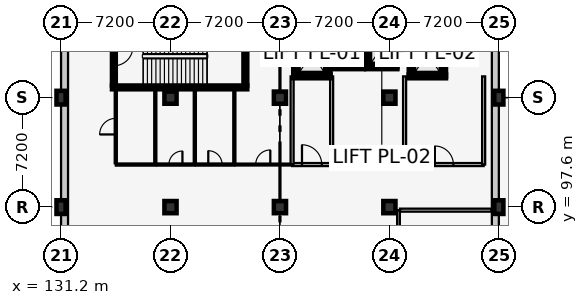
"""IFC4 building model, lengths in metres.
Left out: names, types, materials, properties, quantities, classifications, styles, units other than length and angle.
Written with IfcOpenShell. Run it as: python <this file> out.ifc"""

import sys

from ifc_helpers import new_model, si_unit, direction, frame, frame_2d, origin, origin_2d, place, context, subcontext, project, spatial, rectangle, extrude, element, fill, save


model = new_model("IFC4")
c1 = context("Model", 3, precision=1e-05, world=origin(), true_north=direction((0.0, 1.0)))
c2 = subcontext(c1, "Body", "Model", "MODEL_VIEW")
j1 = project(units=[si_unit("LENGTHUNIT", "METRE"), si_unit("PLANEANGLEUNIT", "RADIAN")], contexts=[c1])
p1 = place(None, origin())
s1 = spatial("IfcSite", under=j1, at=p1, CompositionType="ELEMENT")
p2 = place(p1, origin())
s2 = spatial("IfcBuilding", under=s1, at=p2, CompositionType="ELEMENT")
p3 = place(p2, origin())
s3 = spatial("IfcBuildingStorey", under=s2, at=p3, CompositionType="ELEMENT", Elevation=0.0)
for number, where, z_axis, x_axis in (
    (1, (131.2, 97.6, 0.0), (0.0, 0.0, 1.0), (1.0, 0.0, 0.0)),
    (2, (131.2, 104.8, 0.0), (0.0, 0.0, 1.0), (1.0, 0.0, 0.0)),
):
    element("IfcColumn", number, at=place(p3, frame(where, z_axis=z_axis, x_axis=x_axis)), inside=s3, PredefinedType="COLUMN", context=c2, shape_type="SweptSolid", body=[
        extrude(rectangle(XDim=0.6, YDim=0.9, at=origin_2d()), origin(), (0.0, 0.0, 1.0), 5.4),
    ])
for number, where, z_axis, x_axis in (
    (3, (138.4, 97.6, 0.0), (0.0, 0.0, 1.0), (1.0, 0.0, 0.0)),
    (4, (138.4, 104.8, 0.0), (0.0, 0.0, 1.0), (1.0, 0.0, 0.0)),
    (5, (145.6, 97.6, 0.0), (0.0, 0.0, 1.0), (1.0, 0.0, 0.0)),
    (6, (145.6, 104.8, 0.0), (0.0, 0.0, 1.0), (1.0, 0.0, 0.0)),
    (7, (152.8, 97.6, 0.0), (0.0, 0.0, 1.0), (1.0, 0.0, 0.0)),
    (8, (152.8, 104.8, 0.0), (0.0, 0.0, 1.0), (1.0, 0.0, 0.0)),
):
    element("IfcColumn", number, at=place(p3, frame(where, z_axis=z_axis, x_axis=x_axis)), inside=s3, PredefinedType="COLUMN", context=c2, shape_type="SweptSolid", body=[
        extrude(rectangle(XDim=0.8, YDim=0.8, at=origin_2d()), origin(), (0.0, 0.0, 1.0), 5.4),
    ])
for number, where, z_axis, x_axis in (
    (9, (160.0, 97.6, 0.0), (0.0, 0.0, 1.0), (1.0, 0.0, 0.0)),
    (10, (160.0, 104.8, 0.0), (0.0, 0.0, 1.0), (1.0, 0.0, 0.0)),
):
    element("IfcColumn", number, at=place(p3, frame(where, z_axis=z_axis, x_axis=x_axis)), inside=s3, PredefinedType="COLUMN", context=c2, shape_type="SweptSolid", body=[
        extrude(rectangle(XDim=0.6, YDim=0.9, at=origin_2d()), origin(), (0.0, 0.0, 1.0), 5.4),
    ])
p4 = place(p3, frame((159.77, 112.0, 0.0), z_axis=(0.0, 0.0, 1.0), x_axis=(0.0, -1.0, 0.0)))
e11 = element("IfcWall", 11, at=p4, inside=s3, PredefinedType="SOLIDWALL", context=c2, shape_type="SweptSolid", body=[
    extrude(rectangle(XDim=28.8, YDim=0.46, at=frame_2d((14.4, 0.0))), origin(), (0.0, 0.0, 1.0), 4.535),
])
p5 = place(p4, frame((16.8, 0.0, 0.0)))
e12 = element("IfcOpeningElement", 12, at=p5, cuts=e11, PredefinedType="OPENING", context=c2, shape_type="SweptSolid", body=[
    extrude(rectangle(XDim=2.4, YDim=2.4, at=frame_2d((1.2, 1.2))), frame((0.0, 0.242, 0.0), z_axis=(0.0, -1.0, 0.0), x_axis=(1.0, 0.0, 0.0)), (0.0, 0.0, 1.0), 0.484),
])
p6 = place(p3, frame((131.43, 83.2, 0.0), z_axis=(0.0, 0.0, 1.0), x_axis=(0.0, 1.0, 0.0)))
e13 = element("IfcWall", 13, at=p6, inside=s3, PredefinedType="SOLIDWALL", context=c2, shape_type="SweptSolid", body=[
    extrude(rectangle(XDim=28.8, YDim=0.46, at=frame_2d((14.4, 0.0))), origin(), (0.0, 0.0, 1.0), 4.535),
])
p7 = place(p6, frame((9.8, 0.0, 0.0)))
e14 = element("IfcOpeningElement", 14, at=p7, cuts=e13, PredefinedType="OPENING", context=c2, shape_type="SweptSolid", body=[
    extrude(rectangle(XDim=2.0, YDim=2.35, at=frame_2d((1.0, 1.175))), frame((0.0, 0.242, 0.0), z_axis=(0.0, -1.0, 0.0), x_axis=(1.0, 0.0, 0.0)), (0.0, 0.0, 1.0), 0.484),
])
p8 = place(p3, frame((134.55, 105.475, 0.0), z_axis=(0.0, 0.0, 1.0), x_axis=(1.0, 0.0, 0.0)))
e15 = element("IfcWall", 15, at=p8, inside=s3, PredefinedType="SHEAR", context=c2, shape_type="SweptSolid", body=[
    extrude(rectangle(XDim=8.9, YDim=0.25, at=frame_2d((4.45, 0.0))), origin(), (0.0, 0.0, 1.0), 5.14),
])
p9 = place(p3, frame((134.675, 109.45, 0.0), z_axis=(0.0, 0.0, 1.0), x_axis=(0.0, -1.0, 0.0)))
e16 = element("IfcWall", 16, at=p9, inside=s3, PredefinedType="SHEAR", context=c2, shape_type="SweptSolid", body=[
    extrude(rectangle(XDim=3.85, YDim=0.25, at=frame_2d((1.925, 0.0))), origin(), (0.0, 0.0, 1.0), 5.14),
])
p10 = place(p9, frame((1.3, 0.0, 0.0)))
e17 = element("IfcOpeningElement", 17, at=p10, cuts=e16, PredefinedType="OPENING", context=c2, shape_type="SweptSolid", body=[
    extrude(rectangle(XDim=1.25, YDim=2.15, at=frame_2d((0.625, 1.075))), frame((0.0, 0.137, 0.0), z_axis=(0.0, -1.0, 0.0), x_axis=(1.0, 0.0, 0.0)), (0.0, 0.0, 1.0), 0.274),
])
p11 = place(p3, frame((143.325, 105.6, 0.0), z_axis=(0.0, 0.0, 1.0), x_axis=(0.0, 1.0, 0.0)))
e18 = element("IfcWall", 18, at=p11, inside=s3, PredefinedType="SHEAR", context=c2, shape_type="SweptSolid", body=[
    extrude(rectangle(XDim=3.85, YDim=0.25, at=frame_2d((1.925, 0.0))), origin(), (0.0, 0.0, 1.0), 5.14),
])
p12 = place(p3, frame((146.475, 106.2, 0.0), z_axis=(0.0, 0.0, 1.0), x_axis=(1.0, 0.0, 0.0)))
e19 = element("IfcWall", 19, at=p12, inside=s3, PredefinedType="SHEAR", context=c2, shape_type="SweptSolid", body=[
    extrude(rectangle(XDim=2.45, YDim=0.25, at=frame_2d((1.225, 0.0))), origin(), (0.0, 0.0, 1.0), 5.14),
])
p13 = place(p12, frame((0.675, 0.0, 0.0)))
e20 = element("IfcOpeningElement", 20, at=p13, cuts=e19, PredefinedType="OPENING", context=c2, shape_type="SweptSolid", body=[
    extrude(rectangle(XDim=1.1, YDim=2.15, at=frame_2d((0.55, 1.075))), frame((0.0, 0.137, 0.0), z_axis=(0.0, -1.0, 0.0), x_axis=(1.0, 0.0, 0.0)), (0.0, 0.0, 1.0), 0.274),
])
for number, where, z_axis, x_axis in (
    (21, (146.6, 109.2, 0.0), (0.0, 0.0, 1.0), (0.0, -1.0, 0.0)),
    (22, (148.8, 106.2, 0.0), (0.0, 0.0, 1.0), (0.0, 1.0, 0.0)),
):
    element("IfcWall", number, at=place(p3, frame(where, z_axis=z_axis, x_axis=x_axis)), inside=s3, PredefinedType="SHEAR", context=c2, shape_type="SweptSolid", body=[
        extrude(rectangle(XDim=3.0, YDim=0.25, at=frame_2d((1.5, 0.0))), origin(), (0.0, 0.0, 1.0), 5.14),
    ])
p14 = place(p3, frame((146.4, 100.4, 0.0), z_axis=(0.0, 0.0, 1.0), x_axis=(1.0, 0.0, 0.0)))
e23 = element("IfcWall", 23, at=p14, inside=s3, PredefinedType="PARTITIONING", context=c2, shape_type="SweptSolid", body=[
    extrude(rectangle(XDim=2.6, YDim=0.2, at=frame_2d((1.3, 0.0))), origin(), (0.0, 0.0, 1.0), 5.14),
])
p15 = place(p14, frame((0.65, 0.0, 0.0)))
e24 = element("IfcOpeningElement", 24, at=p15, cuts=e23, PredefinedType="OPENING", context=c2, shape_type="SweptSolid", body=[
    extrude(rectangle(XDim=1.3, YDim=2.2, at=frame_2d((0.65, 1.1))), frame((0.0, 0.112, 0.0), z_axis=(0.0, -1.0, 0.0), x_axis=(1.0, 0.0, 0.0)), (0.0, 0.0, 1.0), 0.224),
])
p16 = place(p3, frame((146.4, 106.2, 0.0), z_axis=(0.0, 0.0, 1.0), x_axis=(0.0, -1.0, 0.0)))
e25 = element("IfcWall", 25, at=p16, inside=s3, PredefinedType="PARTITIONING", context=c2, shape_type="SweptSolid", body=[
    extrude(rectangle(XDim=5.8, YDim=0.2, at=frame_2d((2.9, 0.0))), origin(), (0.0, 0.0, 1.0), 5.14),
])
p17 = place(p3, frame((149.0, 100.4, 0.0), z_axis=(0.0, 0.0, 1.0), x_axis=(0.0, 1.0, 0.0)))
e26 = element("IfcWall", 26, at=p17, inside=s3, PredefinedType="PARTITIONING", context=c2, shape_type="SweptSolid", body=[
    extrude(rectangle(XDim=5.8, YDim=0.2, at=frame_2d((2.9, 0.0))), origin(), (0.0, 0.0, 1.0), 4.755),
])
p18 = place(p3, frame((154.075, 106.2, 0.0), z_axis=(0.0, 0.0, 1.0), x_axis=(1.0, 0.0, 0.0)))
e27 = element("IfcWall", 27, at=p18, inside=s3, PredefinedType="SHEAR", context=c2, shape_type="SweptSolid", body=[
    extrude(rectangle(XDim=2.45, YDim=0.25, at=frame_2d((1.225, 0.0))), origin(), (0.0, 0.0, 1.0), 5.14),
])
p19 = place(p18, frame((0.675, 0.0, 0.0)))
e28 = element("IfcOpeningElement", 28, at=p19, cuts=e27, PredefinedType="OPENING", context=c2, shape_type="SweptSolid", body=[
    extrude(rectangle(XDim=1.1, YDim=2.15, at=frame_2d((0.55, 1.075))), frame((0.0, 0.137, 0.0), z_axis=(0.0, -1.0, 0.0), x_axis=(1.0, 0.0, 0.0)), (0.0, 0.0, 1.0), 0.274),
])
for number, where, z_axis, x_axis in (
    (29, (154.2, 109.2, 0.0), (0.0, 0.0, 1.0), (0.0, -1.0, 0.0)),
    (30, (156.4, 106.2, 0.0), (0.0, 0.0, 1.0), (0.0, 1.0, 0.0)),
):
    element("IfcWall", number, at=place(p3, frame(where, z_axis=z_axis, x_axis=x_axis)), inside=s3, PredefinedType="SHEAR", context=c2, shape_type="SweptSolid", body=[
        extrude(rectangle(XDim=3.0, YDim=0.25, at=frame_2d((1.5, 0.0))), origin(), (0.0, 0.0, 1.0), 5.14),
    ])
p20 = place(p3, frame((153.8, 100.4, 0.0), z_axis=(0.0, 0.0, 1.0), x_axis=(1.0, 0.0, 0.0)))
e31 = element("IfcWall", 31, at=p20, inside=s3, PredefinedType="PARTITIONING", context=c2, shape_type="SweptSolid", body=[
    extrude(rectangle(XDim=5.2, YDim=0.2, at=frame_2d((2.6, 0.0))), origin(), (0.0, 0.0, 1.0), 5.14),
])
p21 = place(p20, frame((1.99, 0.0, 0.0)))
e32 = element("IfcOpeningElement", 32, at=p21, cuts=e31, PredefinedType="OPENING", context=c2, shape_type="SweptSolid", body=[
    extrude(rectangle(XDim=1.22, YDim=2.2, at=frame_2d((0.61, 1.1))), frame((0.0, 0.112, 0.0), z_axis=(0.0, -1.0, 0.0), x_axis=(1.0, 0.0, 0.0)), (0.0, 0.0, 1.0), 0.224),
])
for number, where, z_axis, x_axis in (
    (33, (153.8, 106.2, 0.0), (0.0, 0.0, 1.0), (0.0, -1.0, 0.0)),
    (34, (159.0, 100.4, 0.0), (0.0, 0.0, 1.0), (0.0, 1.0, 0.0)),
):
    element("IfcWall", number, at=place(p3, frame(where, z_axis=z_axis, x_axis=x_axis)), inside=s3, PredefinedType="PARTITIONING", context=c2, shape_type="SweptSolid", body=[
        extrude(rectangle(XDim=5.8, YDim=0.2, at=frame_2d((2.9, 0.0))), origin(), (0.0, 0.0, 1.0), 5.14),
    ])
p22 = place(p3, frame((149.075, 106.8, 0.0), z_axis=(0.0, 0.0, 1.0), x_axis=(1.0, 0.0, 0.0)))
e35 = element("IfcWall", 35, at=p22, inside=s3, PredefinedType="SHEAR", context=c2, shape_type="SweptSolid", body=[
    extrude(rectangle(XDim=2.05, YDim=0.25, at=frame_2d((1.025, 0.0))), origin(), (0.0, 0.0, 1.0), 5.14),
])
p23 = place(p22, frame((0.525, 0.0, 0.0)))
e36 = element("IfcOpeningElement", 36, at=p23, cuts=e35, PredefinedType="OPENING", context=c2, shape_type="SweptSolid", body=[
    extrude(rectangle(XDim=1.0, YDim=2.15, at=frame_2d((0.5, 1.075))), frame((0.0, 0.137, 0.0), z_axis=(0.0, -1.0, 0.0), x_axis=(1.0, 0.0, 0.0)), (0.0, 0.0, 1.0), 0.274),
])
for number, where, z_axis, x_axis in (
    (37, (149.2, 109.4, 0.0), (0.0, 0.0, 1.0), (0.0, -1.0, 0.0)),
    (38, (151.0, 106.8, 0.0), (0.0, 0.0, 1.0), (0.0, 1.0, 0.0)),
):
    element("IfcWall", number, at=place(p3, frame(where, z_axis=z_axis, x_axis=x_axis)), inside=s3, PredefinedType="SHEAR", context=c2, shape_type="SweptSolid", body=[
        extrude(rectangle(XDim=2.6, YDim=0.25, at=frame_2d((1.3, 0.0))), origin(), (0.0, 0.0, 1.0), 5.14),
    ])
p24 = place(p3, frame((151.275, 106.8, 0.0), z_axis=(0.0, 0.0, 1.0), x_axis=(1.0, 0.0, 0.0)))
e39 = element("IfcWall", 39, at=p24, inside=s3, PredefinedType="SHEAR", context=c2, shape_type="SweptSolid", body=[
    extrude(rectangle(XDim=2.05, YDim=0.25, at=frame_2d((1.025, 0.0))), origin(), (0.0, 0.0, 1.0), 5.14),
])
p25 = place(p24, frame((0.525, 0.0, 0.0)))
e40 = element("IfcOpeningElement", 40, at=p25, cuts=e39, PredefinedType="OPENING", context=c2, shape_type="SweptSolid", body=[
    extrude(rectangle(XDim=1.0, YDim=2.15, at=frame_2d((0.5, 1.075))), frame((0.0, 0.137, 0.0), z_axis=(0.0, -1.0, 0.0), x_axis=(1.0, 0.0, 0.0)), (0.0, 0.0, 1.0), 0.274),
])
for number, where, z_axis, x_axis in (
    (41, (151.4, 109.4, 0.0), (0.0, 0.0, 1.0), (0.0, -1.0, 0.0)),
    (42, (153.2, 106.8, 0.0), (0.0, 0.0, 1.0), (0.0, 1.0, 0.0)),
):
    element("IfcWall", number, at=place(p3, frame(where, z_axis=z_axis, x_axis=x_axis)), inside=s3, PredefinedType="SHEAR", context=c2, shape_type="SweptSolid", body=[
        extrude(rectangle(XDim=2.6, YDim=0.25, at=frame_2d((1.3, 0.0))), origin(), (0.0, 0.0, 1.0), 5.14),
    ])
p26 = place(p3, frame((134.8, 100.4, 0.0), z_axis=(0.0, 0.0, 1.0), x_axis=(1.0, 0.0, 0.0)))
e43 = element("IfcWall", 43, at=p26, inside=s3, PredefinedType="PARTITIONING", context=c2, shape_type="SweptSolid", body=[
    extrude(rectangle(XDim=2.6, YDim=0.14, at=frame_2d((1.3, 0.0))), origin(), (0.0, 0.0, 1.0), 5.14),
])
p27 = place(p3, frame((134.8, 100.48, 0.0), z_axis=(0.0, 0.0, 1.0), x_axis=(0.0, 1.0, 0.0)))
e44 = element("IfcWall", 44, at=p27, inside=s3, PredefinedType="PARTITIONING", context=c2, shape_type="SweptSolid", body=[
    extrude(rectangle(XDim=4.86, YDim=0.14, at=frame_2d((2.43, 0.0))), origin(), (0.0, 0.0, 1.0), 4.725),
])
p28 = place(p27, frame((1.9, 0.0, 0.0)))
e45 = element("IfcOpeningElement", 45, at=p28, cuts=e44, PredefinedType="OPENING", context=c2, shape_type="SweptSolid", body=[
    extrude(rectangle(XDim=1.06, YDim=2.1, at=frame_2d((0.53, 1.05))), frame((0.0, 0.082, 0.0), z_axis=(0.0, -1.0, 0.0), x_axis=(1.0, 0.0, 0.0)), (0.0, 0.0, 1.0), 0.164),
])
p29 = place(p3, frame((137.4, 100.48, 0.0), z_axis=(0.0, 0.0, 1.0), x_axis=(0.0, 1.0, 0.0)))
e46 = element("IfcWall", 46, at=p29, inside=s3, PredefinedType="PARTITIONING", context=c2, shape_type="SweptSolid", body=[
    extrude(rectangle(XDim=4.86, YDim=0.14, at=frame_2d((2.43, 0.0))), origin(), (0.0, 0.0, 1.0), 5.14),
])
p30 = place(p3, frame((137.48, 100.4, 0.0), z_axis=(0.0, 0.0, 1.0), x_axis=(1.0, 0.0, 0.0)))
e47 = element("IfcWall", 47, at=p30, inside=s3, PredefinedType="PARTITIONING", context=c2, shape_type="SweptSolid", body=[
    extrude(rectangle(XDim=2.52, YDim=0.14, at=frame_2d((1.26, 0.0))), origin(), (0.0, 0.0, 1.0), 5.14),
])
p31 = place(p30, frame((0.815, 0.0, 0.0)))
e48 = element("IfcOpeningElement", 48, at=p31, cuts=e47, PredefinedType="OPENING", context=c2, shape_type="SweptSolid", body=[
    extrude(rectangle(XDim=0.89, YDim=2.05, at=frame_2d((0.445, 1.025))), frame((0.0, 0.082, 0.0), z_axis=(0.0, -1.0, 0.0), x_axis=(1.0, 0.0, 0.0)), (0.0, 0.0, 1.0), 0.164),
])
p32 = place(p3, frame((140.0, 100.48, 0.0), z_axis=(0.0, 0.0, 1.0), x_axis=(0.0, 1.0, 0.0)))
e49 = element("IfcWall", 49, at=p32, inside=s3, PredefinedType="PARTITIONING", context=c2, shape_type="SweptSolid", body=[
    extrude(rectangle(XDim=4.86, YDim=0.14, at=frame_2d((2.43, 0.0))), origin(), (0.0, 0.0, 1.0), 5.14),
])
p33 = place(p3, frame((140.08, 100.4, 0.0), z_axis=(0.0, 0.0, 1.0), x_axis=(1.0, 0.0, 0.0)))
e50 = element("IfcWall", 50, at=p33, inside=s3, PredefinedType="PARTITIONING", context=c2, shape_type="SweptSolid", body=[
    extrude(rectangle(XDim=2.52, YDim=0.14, at=frame_2d((1.26, 0.0))), origin(), (0.0, 0.0, 1.0), 5.14),
])
p34 = place(p33, frame((0.805, 0.0, 0.0)))
e51 = element("IfcOpeningElement", 51, at=p34, cuts=e50, PredefinedType="OPENING", context=c2, shape_type="SweptSolid", body=[
    extrude(rectangle(XDim=0.91, YDim=2.06, at=frame_2d((0.455, 1.03))), frame((0.0, 0.082, 0.0), z_axis=(0.0, -1.0, 0.0), x_axis=(1.0, 0.0, 0.0)), (0.0, 0.0, 1.0), 0.164),
])
p35 = place(p3, frame((142.6, 100.48, 0.0), z_axis=(0.0, 0.0, 1.0), x_axis=(0.0, 1.0, 0.0)))
e52 = element("IfcWall", 52, at=p35, inside=s3, PredefinedType="PARTITIONING", context=c2, shape_type="SweptSolid", body=[
    extrude(rectangle(XDim=4.86, YDim=0.14, at=frame_2d((2.43, 0.0))), origin(), (0.0, 0.0, 1.0), 5.14),
])
p36 = place(p3, frame((142.68, 100.4, 0.0), z_axis=(0.0, 0.0, 1.0), x_axis=(1.0, 0.0, 0.0)))
e53 = element("IfcWall", 53, at=p36, inside=s3, PredefinedType="PARTITIONING", context=c2, shape_type="SweptSolid", body=[
    extrude(rectangle(XDim=3.61, YDim=0.125, at=frame_2d((1.805, 0.0))), origin(), (0.0, 0.0, 1.0), 5.14),
])
p37 = place(p36, frame((1.325, 0.0, 0.0)))
e54 = element("IfcOpeningElement", 54, at=p37, cuts=e53, PredefinedType="OPENING", context=c2, shape_type="SweptSolid", body=[
    extrude(rectangle(XDim=0.96, YDim=2.1, at=frame_2d((0.48, 1.05))), frame((0.0, 0.074, 0.0), z_axis=(0.0, -1.0, 0.0), x_axis=(1.0, 0.0, 0.0)), (0.0, 0.0, 1.0), 0.149),
])
p38 = place(p3, frame((153.4, 90.5, 0.0), z_axis=(0.0, 0.0, 1.0), x_axis=(0.0, 1.0, 0.0)))
e55 = element("IfcWall", 55, at=p38, inside=s3, PredefinedType="PARTITIONING", context=c2, shape_type="SweptSolid", body=[
    extrude(rectangle(XDim=6.9, YDim=0.18, at=frame_2d((3.45, 0.0))), origin(), (0.0, 0.0, 1.0), 5.14),
])
p39 = place(p38, frame((2.79, 0.0, 0.0)))
e56 = element("IfcOpeningElement", 56, at=p39, cuts=e55, PredefinedType="OPENING", context=c2, shape_type="SweptSolid", body=[
    extrude(rectangle(XDim=1.32, YDim=2.15, at=frame_2d((0.66, 1.075))), frame((0.0, 0.102, 0.0), z_axis=(0.0, -1.0, 0.0), x_axis=(1.0, 0.0, 0.0)), (0.0, 0.0, 1.0), 0.204),
])
p40 = place(p3, frame((153.5, 97.4, 0.0), z_axis=(0.0, 0.0, 1.0), x_axis=(1.0, 0.0, 0.0)))
e57 = element("IfcWall", 57, at=p40, inside=s3, PredefinedType="PARTITIONING", context=c2, shape_type="SweptSolid", body=[
    extrude(rectangle(XDim=6.03, YDim=0.2, at=frame_2d((3.015, 0.0))), origin(), (0.0, 0.0, 1.0), 4.365),
])
p41 = place(p10, origin())
e58 = element("IfcDoor", 58, at=p41, inside=s3, OperationType="SINGLE_SWING_LEFT", PredefinedType="DOOR", context=c2, shape_type="SweptSolid", body=[
    extrude(rectangle(XDim=1.25, YDim=2.15, at=frame_2d((0.625, 1.075))), frame((0.0, 0.025, 0.0), z_axis=(0.0, -1.0, 0.0), x_axis=(1.0, 0.0, 0.0)), (0.0, 0.0, 1.0), 0.05),
])
fill(e17, e58)
p42 = place(p13, origin())
e59 = element("IfcDoor", 59, at=p42, inside=s3, OperationType="SLIDING_TO_LEFT", PredefinedType="DOOR", context=c2, shape_type="SweptSolid", body=[
    extrude(rectangle(XDim=1.1, YDim=2.15, at=frame_2d((0.55, 1.075))), frame((0.0, 0.025, 0.0), z_axis=(0.0, -1.0, 0.0), x_axis=(1.0, 0.0, 0.0)), (0.0, 0.0, 1.0), 0.05),
])
fill(e20, e59)
p43 = place(p15, origin())
e60 = element("IfcDoor", 60, at=p43, inside=s3, OperationType="SINGLE_SWING_LEFT", PredefinedType="DOOR", context=c2, shape_type="SweptSolid", body=[
    extrude(rectangle(XDim=1.3, YDim=2.2, at=frame_2d((0.65, 1.1))), frame((0.0, 0.025, 0.0), z_axis=(0.0, -1.0, 0.0), x_axis=(1.0, 0.0, 0.0)), (0.0, 0.0, 1.0), 0.05),
])
fill(e24, e60)
p44 = place(p19, origin())
e61 = element("IfcDoor", 61, at=p44, inside=s3, OperationType="SLIDING_TO_LEFT", PredefinedType="DOOR", context=c2, shape_type="SweptSolid", body=[
    extrude(rectangle(XDim=1.1, YDim=2.15, at=frame_2d((0.55, 1.075))), frame((0.0, 0.025, 0.0), z_axis=(0.0, -1.0, 0.0), x_axis=(1.0, 0.0, 0.0)), (0.0, 0.0, 1.0), 0.05),
])
fill(e28, e61)
p45 = place(p21, origin())
e62 = element("IfcDoor", 62, at=p45, inside=s3, OperationType="SINGLE_SWING_LEFT", PredefinedType="DOOR", context=c2, shape_type="SweptSolid", body=[
    extrude(rectangle(XDim=1.22, YDim=2.2, at=frame_2d((0.61, 1.1))), frame((0.0, 0.025, 0.0), z_axis=(0.0, -1.0, 0.0), x_axis=(1.0, 0.0, 0.0)), (0.0, 0.0, 1.0), 0.05),
])
fill(e32, e62)
p46 = place(p23, origin())
e63 = element("IfcDoor", 63, at=p46, inside=s3, OperationType="SLIDING_TO_LEFT", PredefinedType="DOOR", context=c2, shape_type="SweptSolid", body=[
    extrude(rectangle(XDim=1.0, YDim=2.15, at=frame_2d((0.5, 1.075))), frame((0.0, 0.025, 0.0), z_axis=(0.0, -1.0, 0.0), x_axis=(1.0, 0.0, 0.0)), (0.0, 0.0, 1.0), 0.05),
])
fill(e36, e63)
p47 = place(p25, origin())
e64 = element("IfcDoor", 64, at=p47, inside=s3, OperationType="SLIDING_TO_LEFT", PredefinedType="DOOR", context=c2, shape_type="SweptSolid", body=[
    extrude(rectangle(XDim=1.0, YDim=2.15, at=frame_2d((0.5, 1.075))), frame((0.0, 0.025, 0.0), z_axis=(0.0, -1.0, 0.0), x_axis=(1.0, 0.0, 0.0)), (0.0, 0.0, 1.0), 0.05),
])
fill(e40, e64)
p48 = place(p28, origin())
e65 = element("IfcDoor", 65, at=p48, inside=s3, OperationType="SINGLE_SWING_LEFT", PredefinedType="DOOR", context=c2, shape_type="SweptSolid", body=[
    extrude(rectangle(XDim=1.06, YDim=2.1, at=frame_2d((0.53, 1.05))), frame((0.0, 0.025, 0.0), z_axis=(0.0, -1.0, 0.0), x_axis=(1.0, 0.0, 0.0)), (0.0, 0.0, 1.0), 0.05),
])
fill(e45, e65)
p49 = place(p31, origin())
e66 = element("IfcDoor", 66, at=p49, inside=s3, OperationType="SINGLE_SWING_RIGHT", PredefinedType="DOOR", context=c2, shape_type="SweptSolid", body=[
    extrude(rectangle(XDim=0.89, YDim=2.05, at=frame_2d((0.445, 1.025))), frame((0.0, 0.025, 0.0), z_axis=(0.0, -1.0, 0.0), x_axis=(1.0, 0.0, 0.0)), (0.0, 0.0, 1.0), 0.05),
])
fill(e48, e66)
p50 = place(p34, origin())
e67 = element("IfcDoor", 67, at=p50, inside=s3, OperationType="SINGLE_SWING_LEFT", PredefinedType="DOOR", context=c2, shape_type="SweptSolid", body=[
    extrude(rectangle(XDim=0.91, YDim=2.06, at=frame_2d((0.455, 1.03))), frame((0.0, 0.025, 0.0), z_axis=(0.0, -1.0, 0.0), x_axis=(1.0, 0.0, 0.0)), (0.0, 0.0, 1.0), 0.05),
])
fill(e51, e67)
p51 = place(p37, origin())
e68 = element("IfcDoor", 68, at=p51, inside=s3, OperationType="SINGLE_SWING_RIGHT", PredefinedType="DOOR", context=c2, shape_type="SweptSolid", body=[
    extrude(rectangle(XDim=0.96, YDim=2.1, at=frame_2d((0.48, 1.05))), frame((0.0, 0.025, 0.0), z_axis=(0.0, -1.0, 0.0), x_axis=(1.0, 0.0, 0.0)), (0.0, 0.0, 1.0), 0.05),
])
fill(e54, e68)
save(model, sys.argv[1])
